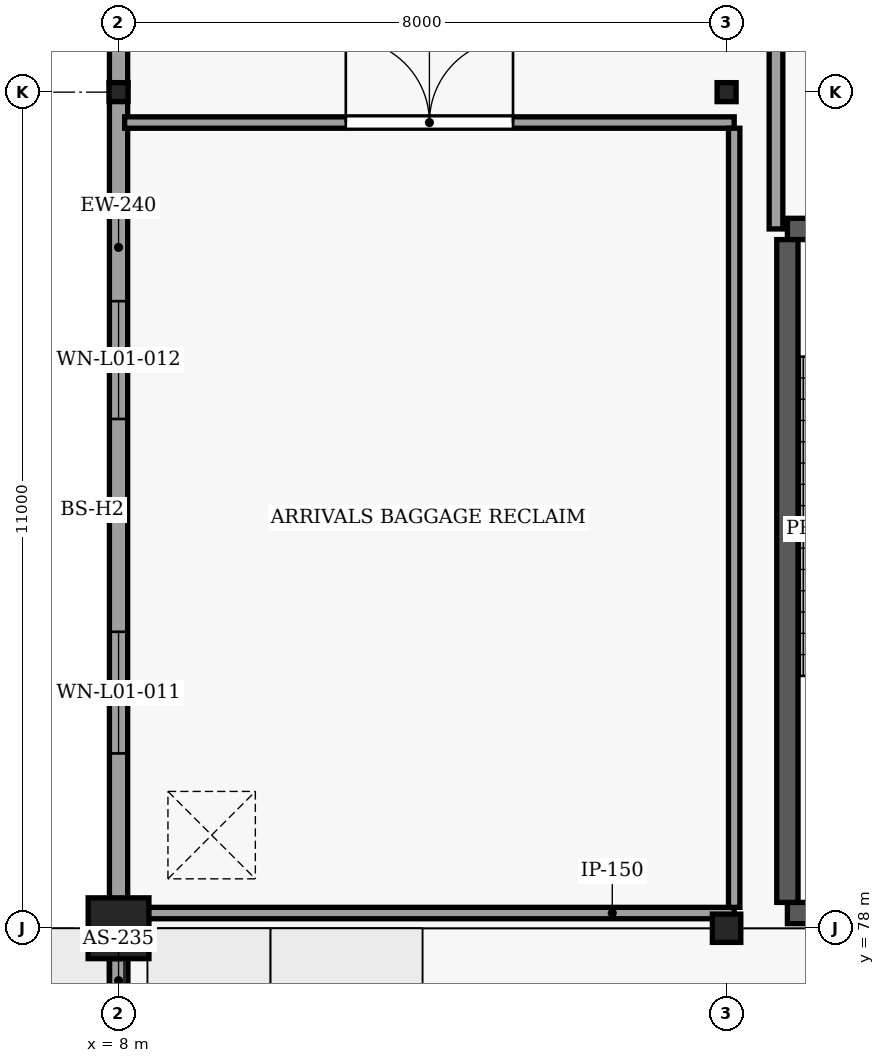
"""IFC4 building model, lengths in metres.
Left out: names, types, materials, properties, quantities, classifications, styles, units other than length and angle.
Written with IfcOpenShell. Run it as: python <this file> out.ifc"""

import sys

from ifc_helpers import new_model, si_unit, direction, frame, frame_2d, origin, origin_2d, place, context, subcontext, project, spatial, rectangle, hollow_rectangle, i_section, extrude, element, fill, save


model = new_model("IFC4")
c1 = context("Model", 3, precision=1e-05, world=origin(), true_north=direction((0.0, 1.0)))
c2 = subcontext(c1, "Body", "Model", "MODEL_VIEW")
j1 = project(units=[si_unit("LENGTHUNIT", "METRE"), si_unit("PLANEANGLEUNIT", "RADIAN")], contexts=[c1])
p1 = place(None, origin())
s1 = spatial("IfcSite", under=j1, at=p1, CompositionType="ELEMENT")
p2 = place(p1, origin())
s2 = spatial("IfcBuilding", under=s1, at=p2, CompositionType="ELEMENT")
p3 = place(p2, origin())
s3 = spatial("IfcBuildingStorey", under=s2, at=p3, CompositionType="ELEMENT", Elevation=0.0)
p4 = place(p3, frame((8.0, 78.0, -0.45), z_axis=(0.0, 0.0, 1.0), x_axis=(1.0, 0.0, 0.0)))
e1 = element("IfcColumn", 1, at=p4, inside=s3, PredefinedType="COLUMN", context=c2, shape_type="SweptSolid", body=[
    extrude(rectangle(XDim=0.8, YDim=0.8, at=origin_2d()), origin(), (0.0, 0.0, 1.0), 5.57),
])
p5 = place(p3, frame((16.0, 78.0, -0.45), z_axis=(0.0, 0.0, 1.0), x_axis=(1.0, 0.0, 0.0)))
e2 = element("IfcColumn", 2, at=p5, inside=s3, PredefinedType="COLUMN", context=c2, shape_type="SweptSolid", body=[
    extrude(i_section(OverallWidth=0.374, OverallDepth=0.372, WebThickness=0.016, FlangeThickness=0.026, FilletRadius=0.016, at=origin_2d()), origin(), (0.0, 0.0, 1.0), 5.57),
])
for number, where, z_axis, x_axis in (
    (3, (8.0, 89.0, -0.45), (0.0, 0.0, 1.0), (1.0, 0.0, 0.0)),
    (4, (16.0, 89.0, -0.45), (0.0, 0.0, 1.0), (1.0, 0.0, 0.0)),
):
    element("IfcColumn", number, at=place(p3, frame(where, z_axis=z_axis, x_axis=x_axis)), inside=s3, PredefinedType="COLUMN", context=c2, shape_type="SweptSolid", body=[
        extrude(hollow_rectangle(XDim=0.25, YDim=0.25, WallThickness=0.012, InnerFilletRadius=0.012, OuterFilletRadius=0.025, at=origin_2d()), origin(), (0.0, 0.0, 1.0), 5.57),
    ])
p6 = place(p3, frame((16.8, 78.2, -0.45), z_axis=(0.0, 0.0, 1.0), x_axis=(1.0, 0.0, 0.0)))
e5 = element("IfcWall", 5, at=p6, inside=s3, PredefinedType="SHEAR", context=c2, shape_type="SweptSolid", body=[
    extrude(rectangle(XDim=4.1, YDim=0.28, at=frame_2d((2.05, 0.0))), origin(), (0.0, 0.0, 1.0), 5.57),
])
p7 = place(p3, frame((16.8, 87.2, -0.45), z_axis=(0.0, 0.0, 1.0), x_axis=(1.0, 0.0, 0.0)))
e6 = element("IfcWall", 6, at=p7, inside=s3, PredefinedType="SHEAR", context=c2, shape_type="SweptSolid", body=[
    extrude(rectangle(XDim=4.1, YDim=0.28, at=frame_2d((2.05, 0.0))), origin(), (0.0, 0.0, 1.0), 5.57),
])
p8 = place(p7, frame((1.5, 0.0, 0.45)))
e7 = element("IfcOpeningElement", 7, at=p8, cuts=e6, PredefinedType="OPENING", context=c2, shape_type="SweptSolid", body=[
    extrude(rectangle(XDim=1.1, YDim=2.2, at=frame_2d((0.55, 1.1))), frame((0.0, 0.15, 0.0), z_axis=(0.0, -1.0, 0.0), x_axis=(1.0, 0.0, 0.0)), (0.0, 0.0, 1.0), 0.3),
])
p9 = place(p3, frame((16.8, 78.34, -0.45), z_axis=(0.0, 0.0, 1.0), x_axis=(0.0, 1.0, 0.0)))
e8 = element("IfcWall", 8, at=p9, inside=s3, PredefinedType="SHEAR", context=c2, shape_type="SweptSolid", body=[
    extrude(rectangle(XDim=8.72, YDim=0.28, at=frame_2d((4.36, 0.0))), origin(), (0.0, 0.0, 1.0), 5.57),
])
p10 = place(p3, frame((8.0, 66.4, 1.88), z_axis=(0.0, 0.0, 1.0), x_axis=(0.0, 1.0, 0.0)))
e9 = element("IfcWall", 9, at=p10, inside=s3, PredefinedType="SOLIDWALL", context=c2, shape_type="SweptSolid", body=[
    extrude(rectangle(XDim=11.2, YDim=0.245, at=frame_2d((5.6, 0.0))), origin(), (0.0, 0.0, 1.0), 0.22),
])
p11 = place(p3, frame((8.0, 76.15, 1.38), z_axis=(0.0, 0.0, 1.0), x_axis=(0.0, 1.0, 0.0)))
e10 = element("IfcWall", 10, at=p11, inside=s3, PredefinedType="SOLIDWALL", context=c2, shape_type="SweptSolid", body=[
    extrude(rectangle(XDim=1.45, YDim=0.235, at=frame_2d((0.725, 0.0))), origin(), (0.0, 0.0, 1.0), 0.5),
])
p12 = place(p3, frame((8.0, 78.3, 0.0), z_axis=(0.0, 0.0, 1.0), x_axis=(0.0, 1.0, 0.0)))
e11 = element("IfcWall", 11, at=p12, inside=s3, PredefinedType="ELEMENTEDWALL", context=c2, shape_type="SweptSolid", body=[
    extrude(rectangle(XDim=10.822, YDim=0.24, at=frame_2d((5.411, 0.0))), origin(), (0.0, 0.0, 1.0), 4.694),
])
p13 = place(p12, frame((2.0, 0.0, 1.1)))
e12 = element("IfcOpeningElement", 12, at=p13, cuts=e11, PredefinedType="OPENING", context=c2, shape_type="SweptSolid", body=[
    extrude(rectangle(XDim=1.6, YDim=1.3, at=frame_2d((0.8, 0.65))), frame((0.0, 0.13, 0.0), z_axis=(0.0, -1.0, 0.0), x_axis=(1.0, 0.0, 0.0)), (0.0, 0.0, 1.0), 0.26),
])
p14 = place(p12, frame((6.4, 0.0, 1.1)))
e13 = element("IfcOpeningElement", 13, at=p14, cuts=e11, PredefinedType="OPENING", context=c2, shape_type="SweptSolid", body=[
    extrude(rectangle(XDim=1.55, YDim=1.35, at=frame_2d((0.775, 0.675))), frame((0.0, 0.13, 0.0), z_axis=(0.0, -1.0, 0.0), x_axis=(1.0, 0.0, 0.0)), (0.0, 0.0, 1.0), 0.26),
])
p15 = place(p3, frame((8.0, 89.11, 0.0), z_axis=(0.0, 0.0, 1.0), x_axis=(0.0, 1.0, 0.0)))
e14 = element("IfcWall", 14, at=p15, inside=s3, PredefinedType="ELEMENTEDWALL", context=c2, shape_type="SweptSolid", body=[
    extrude(rectangle(XDim=11.012, YDim=0.24, at=frame_2d((5.506, 0.0))), origin(), (0.0, 0.0, 1.0), 4.694),
])
p16 = place(p15, frame((2.19, 0.0, 1.1)))
e15 = element("IfcOpeningElement", 15, at=p16, cuts=e14, PredefinedType="OPENING", context=c2, shape_type="SweptSolid", body=[
    extrude(rectangle(XDim=1.6, YDim=1.3, at=frame_2d((0.8, 0.65))), frame((0.0, 0.13, 0.0), z_axis=(0.0, -1.0, 0.0), x_axis=(1.0, 0.0, 0.0)), (0.0, 0.0, 1.0), 0.26),
])
p17 = place(p15, frame((6.59, 0.0, 1.1)))
e16 = element("IfcOpeningElement", 16, at=p17, cuts=e14, PredefinedType="OPENING", context=c2, shape_type="SweptSolid", body=[
    extrude(rectangle(XDim=1.55, YDim=1.35, at=frame_2d((0.775, 0.675))), frame((0.0, 0.13, 0.0), z_axis=(0.0, -1.0, 0.0), x_axis=(1.0, 0.0, 0.0)), (0.0, 0.0, 1.0), 0.26),
])
p18 = place(p3, frame((16.65, 87.2, 0.0), z_axis=(0.0, 0.0, 1.0), x_axis=(0.0, 1.0, 0.0)))
e17 = element("IfcWall", 17, at=p18, inside=s3, PredefinedType="SOLIDWALL", context=c2, shape_type="SweptSolid", body=[
    extrude(rectangle(XDim=2.51, YDim=0.18, at=frame_2d((1.255, 0.0))), origin(), (0.0, 0.0, 1.0), 4.66),
])
p19 = place(p3, frame((8.08, 78.2, 0.0), z_axis=(0.0, 0.0, 1.0), x_axis=(1.0, 0.0, 0.0)))
e18 = element("IfcWall", 18, at=p19, inside=s3, PredefinedType="PARTITIONING", context=c2, shape_type="SweptSolid", body=[
    extrude(rectangle(XDim=8.02, YDim=0.15, at=frame_2d((4.01, 0.0))), origin(), (0.0, 0.0, 1.0), 3.415),
])
p20 = place(p3, frame((8.08, 88.6, 0.0), z_axis=(0.0, 0.0, 1.0), x_axis=(1.0, 0.0, 0.0)))
e19 = element("IfcWall", 19, at=p20, inside=s3, PredefinedType="PARTITIONING", context=c2, shape_type="SweptSolid", body=[
    extrude(rectangle(XDim=8.02, YDim=0.15, at=frame_2d((4.01, 0.0))), origin(), (0.0, 0.0, 1.0), 4.696),
])
p21 = place(p20, frame((2.91, 0.0, 0.0)))
e20 = element("IfcOpeningElement", 20, at=p21, cuts=e19, PredefinedType="OPENING", context=c2, shape_type="SweptSolid", body=[
    extrude(rectangle(XDim=2.2, YDim=2.45, at=frame_2d((1.1, 1.225))), frame((0.0, 0.085, 0.0), z_axis=(0.0, -1.0, 0.0), x_axis=(1.0, 0.0, 0.0)), (0.0, 0.0, 1.0), 0.17),
])
p22 = place(p3, frame((16.1, 78.275, 0.0), z_axis=(0.0, 0.0, 1.0), x_axis=(0.0, 1.0, 0.0)))
e21 = element("IfcWall", 21, at=p22, inside=s3, PredefinedType="PARTITIONING", context=c2, shape_type="SweptSolid", body=[
    extrude(rectangle(XDim=10.25, YDim=0.15, at=frame_2d((5.125, 0.0))), origin(), (0.0, 0.0, 1.0), 4.696),
])
p23 = place(p13, origin())
e22 = element("IfcWindow", 22, at=p23, inside=s3, PartitioningType="SINGLE_PANEL", PredefinedType="WINDOW", context=c2, shape_type="SweptSolid", body=[
    extrude(rectangle(XDim=1.6, YDim=1.3, at=frame_2d((0.8, 0.65))), frame((0.0, 0.03, 0.0), z_axis=(0.0, -1.0, 0.0), x_axis=(1.0, 0.0, 0.0)), (0.0, 0.0, 1.0), 0.06),
])
fill(e12, e22)
p24 = place(p14, origin())
e23 = element("IfcWindow", 23, at=p24, inside=s3, PartitioningType="SINGLE_PANEL", PredefinedType="WINDOW", context=c2, shape_type="SweptSolid", body=[
    extrude(rectangle(XDim=1.55, YDim=1.35, at=frame_2d((0.775, 0.675))), frame((0.0, 0.03, 0.0), z_axis=(0.0, -1.0, 0.0), x_axis=(1.0, 0.0, 0.0)), (0.0, 0.0, 1.0), 0.06),
])
fill(e13, e23)
p25 = place(p21, origin())
e24 = element("IfcDoor", 24, at=p25, inside=s3, OperationType="DOUBLE_DOOR_SINGLE_SWING", PredefinedType="DOOR", context=c2, shape_type="SweptSolid", body=[
    extrude(rectangle(XDim=2.2, YDim=2.45, at=frame_2d((1.1, 1.225))), frame((0.0, 0.025, 0.0), z_axis=(0.0, -1.0, 0.0), x_axis=(1.0, 0.0, 0.0)), (0.0, 0.0, 1.0), 0.05),
])
fill(e20, e24)
save(model, sys.argv[1])
